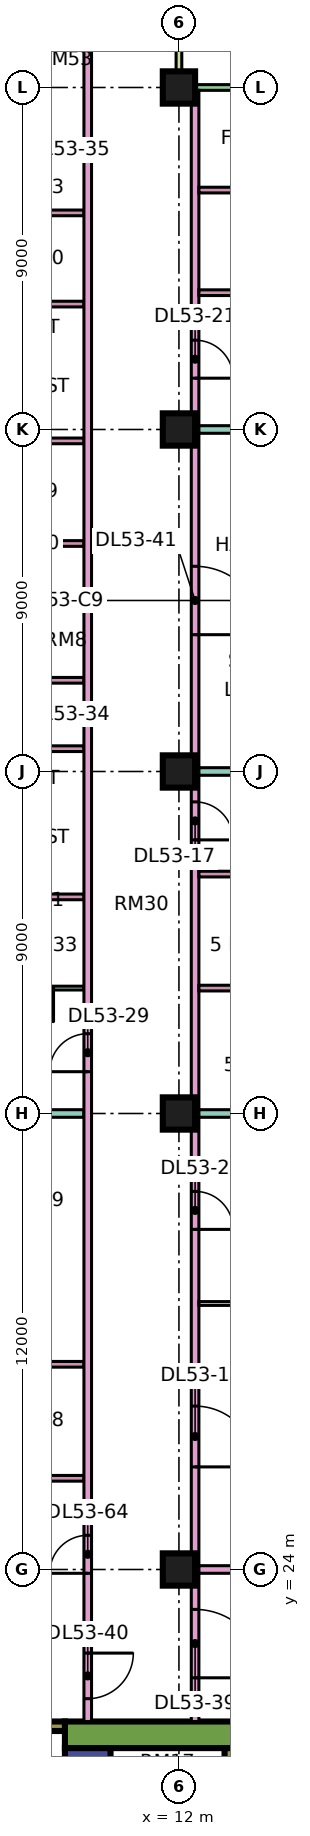
"""IFC4 building model, lengths in metres.
Left out: names, types, materials, properties, quantities, classifications, styles, units other than length and angle.
Written with IfcOpenShell. Run it as: python <this file> out.ifc"""

import sys

from ifc_helpers import new_model, si_unit, direction, frame, frame_2d, origin, origin_2d, place, context, subcontext, project, spatial, rectangle, extrude, element, fill, save


model = new_model("IFC4")
c1 = context("Model", 3, precision=1e-05, world=origin(), true_north=direction((0.0, 1.0)))
c2 = subcontext(c1, "Body", "Model", "MODEL_VIEW")
j1 = project(units=[si_unit("LENGTHUNIT", "METRE"), si_unit("PLANEANGLEUNIT", "RADIAN")], contexts=[c1])
p1 = place(None, origin())
s1 = spatial("IfcSite", under=j1, at=p1, CompositionType="ELEMENT")
p2 = place(p1, origin())
s2 = spatial("IfcBuilding", under=s1, at=p2, CompositionType="ELEMENT")
p3 = place(p2, frame((0.0, 0.0, 226.65)))
s3 = spatial("IfcBuildingStorey", under=s2, at=p3, CompositionType="ELEMENT", Elevation=226.65)
for number, where, z_axis, x_axis in (
    (1, (12.0, 24.0, 0.0), (0.0, 0.0, 1.0), (1.0, 0.0, 0.0)),
    (2, (12.0, 36.0, 0.0), (0.0, 0.0, 1.0), (1.0, 0.0, 0.0)),
    (3, (12.0, 45.0, 0.0), (0.0, 0.0, 1.0), (1.0, 0.0, 0.0)),
    (4, (12.0, 54.0, 0.0), (0.0, 0.0, 1.0), (1.0, 0.0, 0.0)),
    (5, (12.0, 63.0, 0.0), (0.0, 0.0, 1.0), (1.0, 0.0, 0.0)),
):
    element("IfcColumn", number, at=place(p3, frame(where, z_axis=z_axis, x_axis=x_axis)), inside=s3, PredefinedType="COLUMN", context=c2, shape_type="SweptSolid", body=[
        extrude(rectangle(XDim=0.85, YDim=0.85, at=origin_2d()), origin(), (0.0, 0.0, 1.0), 3.75),
    ])
p4 = place(p3, frame((9.0, 19.65, 0.0), z_axis=(0.0, 0.0, 1.0), x_axis=(1.0, 0.0, 0.0)))
e6 = element("IfcWall", 6, at=p4, inside=s3, PredefinedType="SHEAR", context=c2, shape_type="SweptSolid", body=[
    extrude(rectangle(XDim=25.0, YDim=0.7, at=frame_2d((12.5, 0.0))), origin(), (0.0, 0.0, 1.0), 3.75),
])
p5 = place(p4, frame((19.1, 0.0, 0.0)))
e7 = element("IfcOpeningElement", 7, at=p5, cuts=e6, PredefinedType="OPENING", context=c2, shape_type="SweptSolid", body=[
    extrude(rectangle(XDim=1.8, YDim=2.4, at=frame_2d((0.9, 1.2))), frame((0.0, 0.36, 0.0), z_axis=(0.0, -1.0, 0.0), x_axis=(1.0, 0.0, 0.0)), (0.0, 0.0, 1.0), 0.72),
])
p6 = place(p3, frame((9.6, 7.7, 0.0), z_axis=(0.0, 0.0, 1.0), x_axis=(0.0, 1.0, 0.0)))
e8 = element("IfcWall", 8, at=p6, inside=s3, PredefinedType="SHEAR", context=c2, shape_type="SweptSolid", body=[
    extrude(rectangle(XDim=11.6, YDim=1.2, at=frame_2d((5.8, 0.0))), origin(), (0.0, 0.0, 1.0), 3.75),
])
p7 = place(p6, frame((4.175, 0.0, 0.0)))
e9 = element("IfcOpeningElement", 9, at=p7, cuts=e8, PredefinedType="OPENING", context=c2, shape_type="SweptSolid", body=[
    extrude(rectangle(XDim=1.1, YDim=2.2, at=frame_2d((0.55, 1.1))), frame((0.0, 0.61, 0.0), z_axis=(0.0, -1.0, 0.0), x_axis=(1.0, 0.0, 0.0)), (0.0, 0.0, 1.0), 1.22),
])
p8 = place(p6, frame((6.675, 0.0, 0.0)))
e10 = element("IfcOpeningElement", 10, at=p8, cuts=e8, PredefinedType="OPENING", context=c2, shape_type="SweptSolid", body=[
    extrude(rectangle(XDim=1.1, YDim=2.2, at=frame_2d((0.55, 1.1))), frame((0.0, 0.61, 0.0), z_axis=(0.0, -1.0, 0.0), x_axis=(1.0, 0.0, 0.0)), (0.0, 0.0, 1.0), 1.22),
])
p9 = place(p6, frame((9.55, 0.0, 0.0)))
e11 = element("IfcOpeningElement", 11, at=p9, cuts=e8, PredefinedType="OPENING", context=c2, shape_type="SweptSolid", body=[
    extrude(rectangle(XDim=1.1, YDim=2.2, at=frame_2d((0.55, 1.1))), frame((0.0, 0.61, 0.0), z_axis=(0.0, -1.0, 0.0), x_axis=(1.0, 0.0, 0.0)), (0.0, 0.0, 1.0), 1.22),
])
p10 = place(p6, frame((1.85, 0.0, 0.0)))
e12 = element("IfcOpeningElement", 12, at=p10, cuts=e8, PredefinedType="OPENING", context=c2, shape_type="SweptSolid", body=[
    extrude(rectangle(XDim=0.9, YDim=2.1, at=frame_2d((0.45, 1.05))), frame((0.0, 0.61, 0.0), z_axis=(0.0, -1.0, 0.0), x_axis=(1.0, 0.0, 0.0)), (0.0, 0.0, 1.0), 1.22),
])
p11 = place(p3, frame((13.325, 7.7, 0.0), z_axis=(0.0, 0.0, 1.0), x_axis=(0.0, 1.0, 0.0)))
e13 = element("IfcWall", 13, at=p11, inside=s3, PredefinedType="SHEAR", context=c2, shape_type="SweptSolid", body=[
    extrude(rectangle(XDim=11.6, YDim=0.25, at=frame_2d((5.8, 0.0))), origin(), (0.0, 0.0, 1.0), 3.75),
])
p12 = place(p3, frame((2.1, 19.875, 0.0), z_axis=(0.0, 0.0, 1.0), x_axis=(1.0, 0.0, 0.0)))
e14 = element("IfcWall", 14, at=p12, inside=s3, PredefinedType="SHEAR", context=c2, shape_type="SweptSolid", body=[
    extrude(rectangle(XDim=6.9, YDim=0.25, at=frame_2d((3.45, 0.0))), origin(), (0.0, 0.0, 1.0), 3.75),
])
p13 = place(p12, frame((1.175, 0.0, 0.0)))
e15 = element("IfcOpeningElement", 15, at=p13, cuts=e14, PredefinedType="OPENING", context=c2, shape_type="SweptSolid", body=[
    extrude(rectangle(XDim=1.1, YDim=2.2, at=frame_2d((0.55, 1.1))), frame((0.0, 0.135, 0.0), z_axis=(0.0, -1.0, 0.0), x_axis=(1.0, 0.0, 0.0)), (0.0, 0.0, 1.0), 0.27),
])
p14 = place(p12, frame((4.6, 0.0, 0.0)))
e16 = element("IfcOpeningElement", 16, at=p14, cuts=e14, PredefinedType="OPENING", context=c2, shape_type="SweptSolid", body=[
    extrude(rectangle(XDim=1.2, YDim=2.2, at=frame_2d((0.6, 1.1))), frame((0.0, 0.135, 0.0), z_axis=(0.0, -1.0, 0.0), x_axis=(1.0, 0.0, 0.0)), (0.0, 0.0, 1.0), 0.27),
])
p15 = place(p3, frame((22.425, 63.0, 0.0), z_axis=(0.0, 0.0, 1.0), x_axis=(-1.0, 0.0, 0.0)))
e17 = element("IfcWall", 17, at=p15, inside=s3, PredefinedType="SOLIDWALL", context=c2, shape_type="SweptSolid", body=[
    extrude(rectangle(XDim=10.35, YDim=0.15, at=frame_2d((5.175, 0.0))), origin(), (0.0, 0.0, 1.0), 3.35),
])
p16 = place(p15, frame((1.4, 0.0, 0.0)))
e18 = element("IfcOpeningElement", 18, at=p16, cuts=e17, PredefinedType="OPENING", context=c2, shape_type="SweptSolid", body=[
    extrude(rectangle(XDim=1.8, YDim=2.4, at=frame_2d((0.9, 1.2))), frame((0.0, 0.085, 0.0), z_axis=(0.0, -1.0, 0.0), x_axis=(1.0, 0.0, 0.0)), (0.0, 0.0, 1.0), 0.17),
])
p17 = place(p15, frame((5.75, 0.0, 0.45)))
e19 = element("IfcOpeningElement", 19, at=p17, cuts=e17, PredefinedType="OPENING", context=c2, shape_type="SweptSolid", body=[
    extrude(rectangle(XDim=3.0, YDim=2.4, at=frame_2d((1.5, 1.2))), frame((0.0, 0.085, 0.0), z_axis=(0.0, -1.0, 0.0), x_axis=(1.0, 0.0, 0.0)), (0.0, 0.0, 1.0), 0.17),
])
p18 = place(p3, frame((12.0, 64.5, 0.0), z_axis=(0.0, 0.0, 1.0), x_axis=(0.0, -1.0, 0.0)))
e20 = element("IfcWall", 20, at=p18, inside=s3, PredefinedType="SOLIDWALL", context=c2, shape_type="SweptSolid", body=[
    extrude(rectangle(XDim=1.5, YDim=0.15, at=frame_2d((0.75, 0.0))), origin(), (0.0, 0.0, 1.0), 3.35),
])
p19 = place(p3, frame((0.0, 36.0, 0.0), z_axis=(0.0, 0.0, 1.0), x_axis=(1.0, 0.0, 0.0)))
e21 = element("IfcWall", 21, at=p19, inside=s3, PredefinedType="PARTITIONING", context=c2, shape_type="SweptSolid", body=[
    extrude(rectangle(XDim=9.5, YDim=0.2, at=frame_2d((4.75, 0.0))), origin(), (0.0, 0.0, 1.0), 3.35),
])
p20 = place(p3, frame((0.074, 22.4, 0.0), z_axis=(0.0, 0.0, 1.0), x_axis=(1.0, 0.0, 0.0)))
e22 = element("IfcWall", 22, at=p20, inside=s3, PredefinedType="PARTITIONING", context=c2, shape_type="SweptSolid", body=[
    extrude(rectangle(XDim=9.426, YDim=0.2, at=frame_2d((4.713, 0.0))), origin(), (0.0, 0.0, 1.0), 3.35),
])
for number, where, z_axis, x_axis in (
    (23, (6.975, 26.4, 0.0), (0.0, 0.0, 1.0), (1.0, 0.0, 0.0)),
    (24, (6.975, 29.4, 0.0), (0.0, 0.0, 1.0), (1.0, 0.0, 0.0)),
):
    element("IfcWall", number, at=place(p3, frame(where, z_axis=z_axis, x_axis=x_axis)), inside=s3, PredefinedType="PARTITIONING", context=c2, shape_type="SweptSolid", body=[
        extrude(rectangle(XDim=2.525, YDim=0.15, at=frame_2d((1.262, 0.0))), origin(), (0.0, 0.0, 1.0), 3.35),
    ])
p21 = place(p3, frame((6.975, 39.3, 0.0), z_axis=(0.0, 0.0, 1.0), x_axis=(1.0, 0.0, 0.0)))
e25 = element("IfcWall", 25, at=p21, inside=s3, PredefinedType="PARTITIONING", context=c2, shape_type="SweptSolid", body=[
    extrude(rectangle(XDim=2.525, YDim=0.1, at=frame_2d((1.262, 0.0))), origin(), (0.0, 0.0, 1.0), 3.35),
])
p22 = place(p21, frame((0.825, 0.0, 0.0)))
e26 = element("IfcOpeningElement", 26, at=p22, cuts=e25, PredefinedType="OPENING", context=c2, shape_type="SweptSolid", body=[
    extrude(rectangle(XDim=0.9, YDim=2.1, at=frame_2d((0.45, 1.05))), frame((0.0, 0.06, 0.0), z_axis=(0.0, -1.0, 0.0), x_axis=(1.0, 0.0, 0.0)), (0.0, 0.0, 1.0), 0.12),
])
for number, where, z_axis, x_axis in (
    (27, (6.975, 41.7, 0.0), (0.0, 0.0, 1.0), (1.0, 0.0, 0.0)),
    (28, (6.975, 45.6, 0.0), (0.0, 0.0, 1.0), (1.0, 0.0, 0.0)),
    (29, (6.975, 47.4, 0.0), (0.0, 0.0, 1.0), (1.0, 0.0, 0.0)),
    (30, (6.975, 51.0, 0.0), (0.0, 0.0, 1.0), (1.0, 0.0, 0.0)),
    (31, (6.975, 53.7, 0.0), (0.0, 0.0, 1.0), (1.0, 0.0, 0.0)),
    (32, (6.975, 57.3, 0.0), (0.0, 0.0, 1.0), (1.0, 0.0, 0.0)),
    (33, (6.975, 59.7, 0.0), (0.0, 0.0, 1.0), (1.0, 0.0, 0.0)),
):
    element("IfcWall", number, at=place(p3, frame(where, z_axis=z_axis, x_axis=x_axis)), inside=s3, PredefinedType="PARTITIONING", context=c2, shape_type="SweptSolid", body=[
        extrude(rectangle(XDim=2.525, YDim=0.15, at=frame_2d((1.262, 0.0))), origin(), (0.0, 0.0, 1.0), 3.35),
    ])
p23 = place(p3, frame((9.6, 20.0, 0.0), z_axis=(0.0, 0.0, 1.0), x_axis=(0.0, 1.0, 0.0)))
e34 = element("IfcWall", 34, at=p23, inside=s3, PredefinedType="PARTITIONING", context=c2, shape_type="SweptSolid", body=[
    extrude(rectangle(XDim=44.35, YDim=0.2, at=frame_2d((22.175, 0.0))), origin(), (0.0, 0.0, 1.0), 3.35),
])
p24 = place(p23, frame((17.1, 0.0, 0.0)))
e35 = element("IfcOpeningElement", 35, at=p24, cuts=e34, PredefinedType="OPENING", context=c2, shape_type="SweptSolid", body=[
    extrude(rectangle(XDim=1.0, YDim=2.1, at=frame_2d((0.5, 1.05))), frame((0.0, 0.11, 0.0), z_axis=(0.0, -1.0, 0.0), x_axis=(1.0, 0.0, 0.0)), (0.0, 0.0, 1.0), 0.22),
])
p25 = place(p23, frame((0.6, 0.0, 0.0)))
e36 = element("IfcOpeningElement", 36, at=p25, cuts=e34, PredefinedType="OPENING", context=c2, shape_type="SweptSolid", body=[
    extrude(rectangle(XDim=1.2, YDim=2.1, at=frame_2d((0.6, 1.05))), frame((0.0, 0.11, 0.0), z_axis=(0.0, -1.0, 0.0), x_axis=(1.0, 0.0, 0.0)), (0.0, 0.0, 1.0), 0.22),
])
p26 = place(p23, frame((3.9, 0.0, 0.0)))
e37 = element("IfcOpeningElement", 37, at=p26, cuts=e34, PredefinedType="OPENING", context=c2, shape_type="SweptSolid", body=[
    extrude(rectangle(XDim=1.0, YDim=2.1, at=frame_2d((0.5, 1.05))), frame((0.0, 0.11, 0.0), z_axis=(0.0, -1.0, 0.0), x_axis=(1.0, 0.0, 0.0)), (0.0, 0.0, 1.0), 0.22),
])
p27 = place(p3, frame((12.425, 20.0, 0.0), z_axis=(0.0, 0.0, 1.0), x_axis=(0.0, 1.0, 0.0)))
e38 = element("IfcWall", 38, at=p27, inside=s3, PredefinedType="PARTITIONING", context=c2, shape_type="SweptSolid", body=[
    extrude(rectangle(XDim=42.926, YDim=0.2, at=frame_2d((21.463, 0.0))), origin(), (0.0, 0.0, 1.0), 3.35),
])
p28 = place(p27, frame((6.7, 0.0, 0.0)))
e39 = element("IfcOpeningElement", 39, at=p28, cuts=e38, PredefinedType="OPENING", context=c2, shape_type="SweptSolid", body=[
    extrude(rectangle(XDim=1.6, YDim=2.1, at=frame_2d((0.8, 1.05))), frame((0.0, 0.11, 0.0), z_axis=(0.0, -1.0, 0.0), x_axis=(1.0, 0.0, 0.0)), (0.0, 0.0, 1.0), 0.22),
])
p29 = place(p27, frame((12.95, 0.0, 0.0)))
e40 = element("IfcOpeningElement", 40, at=p29, cuts=e38, PredefinedType="OPENING", context=c2, shape_type="SweptSolid", body=[
    extrude(rectangle(XDim=1.0, YDim=2.1, at=frame_2d((0.5, 1.05))), frame((0.0, 0.11, 0.0), z_axis=(0.0, -1.0, 0.0), x_axis=(1.0, 0.0, 0.0)), (0.0, 0.0, 1.0), 0.22),
])
p30 = place(p27, frame((23.2, 0.0, 0.0)))
e41 = element("IfcOpeningElement", 41, at=p30, cuts=e38, PredefinedType="OPENING", context=c2, shape_type="SweptSolid", body=[
    extrude(rectangle(XDim=1.0, YDim=2.1, at=frame_2d((0.5, 1.05))), frame((0.0, 0.11, 0.0), z_axis=(0.0, -1.0, 0.0), x_axis=(1.0, 0.0, 0.0)), (0.0, 0.0, 1.0), 0.22),
])
p31 = place(p27, frame((35.35, 0.0, 0.0)))
e42 = element("IfcOpeningElement", 42, at=p31, cuts=e38, PredefinedType="OPENING", context=c2, shape_type="SweptSolid", body=[
    extrude(rectangle(XDim=1.0, YDim=2.1, at=frame_2d((0.5, 1.05))), frame((0.0, 0.11, 0.0), z_axis=(0.0, -1.0, 0.0), x_axis=(1.0, 0.0, 0.0)), (0.0, 0.0, 1.0), 0.22),
])
p32 = place(p27, frame((1.15, 0.0, 0.0)))
e43 = element("IfcOpeningElement", 43, at=p32, cuts=e38, PredefinedType="OPENING", context=c2, shape_type="SweptSolid", body=[
    extrude(rectangle(XDim=1.8, YDim=2.1, at=frame_2d((0.9, 1.05))), frame((0.0, 0.11, 0.0), z_axis=(0.0, -1.0, 0.0), x_axis=(1.0, 0.0, 0.0)), (0.0, 0.0, 1.0), 0.22),
])
p33 = place(p27, frame((28.6, 0.0, 0.0)))
e44 = element("IfcOpeningElement", 44, at=p33, cuts=e38, PredefinedType="OPENING", context=c2, shape_type="SweptSolid", body=[
    extrude(rectangle(XDim=1.8, YDim=2.1, at=frame_2d((0.9, 1.05))), frame((0.0, 0.11, 0.0), z_axis=(0.0, -1.0, 0.0), x_axis=(1.0, 0.0, 0.0)), (0.0, 0.0, 1.0), 0.22),
])
p34 = place(p3, frame((12.525, 24.0, 0.0), z_axis=(0.0, 0.0, 1.0), x_axis=(1.0, 0.0, 0.0)))
e45 = element("IfcWall", 45, at=p34, inside=s3, PredefinedType="PARTITIONING", context=c2, shape_type="SweptSolid", body=[
    extrude(rectangle(XDim=8.975, YDim=0.2, at=frame_2d((4.488, 0.0))), origin(), (0.0, 0.0, 1.0), 3.35),
])
p35 = place(p3, frame((12.525, 31.0, 0.0), z_axis=(0.0, 0.0, 1.0), x_axis=(1.0, 0.0, 0.0)))
e46 = element("IfcWall", 46, at=p35, inside=s3, PredefinedType="PARTITIONING", context=c2, shape_type="SweptSolid", body=[
    extrude(rectangle(XDim=8.975, YDim=0.1, at=frame_2d((4.488, 0.0))), origin(), (0.0, 0.0, 1.0), 3.35),
])
p36 = place(p3, frame((12.525, 36.0, 0.0), z_axis=(0.0, 0.0, 1.0), x_axis=(1.0, 0.0, 0.0)))
e47 = element("IfcWall", 47, at=p36, inside=s3, PredefinedType="PARTITIONING", context=c2, shape_type="SweptSolid", body=[
    extrude(rectangle(XDim=11.475, YDim=0.2, at=frame_2d((5.738, 0.0))), origin(), (0.0, 0.0, 1.0), 3.35),
])
p37 = place(p3, frame((12.525, 39.3, 0.0), z_axis=(0.0, 0.0, 1.0), x_axis=(1.0, 0.0, 0.0)))
e48 = element("IfcWall", 48, at=p37, inside=s3, PredefinedType="PARTITIONING", context=c2, shape_type="SweptSolid", body=[
    extrude(rectangle(XDim=4.025, YDim=0.15, at=frame_2d((2.013, 0.0))), origin(), (0.0, 0.0, 1.0), 3.35),
])
p38 = place(p3, frame((12.525, 42.3, 0.0), z_axis=(0.0, 0.0, 1.0), x_axis=(1.0, 0.0, 0.0)))
e49 = element("IfcWall", 49, at=p38, inside=s3, PredefinedType="PARTITIONING", context=c2, shape_type="SweptSolid", body=[
    extrude(rectangle(XDim=4.025, YDim=0.15, at=frame_2d((2.013, 0.0))), origin(), (0.0, 0.0, 1.0), 3.35),
])
p39 = place(p38, frame((1.55, 0.0, 0.0)))
e50 = element("IfcOpeningElement", 50, at=p39, cuts=e49, PredefinedType="OPENING", context=c2, shape_type="SweptSolid", body=[
    extrude(rectangle(XDim=0.8, YDim=2.1, at=frame_2d((0.4, 1.05))), frame((0.0, 0.085, 0.0), z_axis=(0.0, -1.0, 0.0), x_axis=(1.0, 0.0, 0.0)), (0.0, 0.0, 1.0), 0.17),
])
p40 = place(p3, frame((12.525, 45.0, 0.0), z_axis=(0.0, 0.0, 1.0), x_axis=(1.0, 0.0, 0.0)))
e51 = element("IfcWall", 51, at=p40, inside=s3, PredefinedType="PARTITIONING", context=c2, shape_type="SweptSolid", body=[
    extrude(rectangle(XDim=11.401, YDim=0.2, at=frame_2d((5.701, 0.0))), origin(), (0.0, 0.0, 1.0), 3.35),
])
p41 = place(p3, frame((12.525, 54.0, 0.0), z_axis=(0.0, 0.0, 1.0), x_axis=(1.0, 0.0, 0.0)))
e52 = element("IfcWall", 52, at=p41, inside=s3, PredefinedType="PARTITIONING", context=c2, shape_type="SweptSolid", body=[
    extrude(rectangle(XDim=11.475, YDim=0.2, at=frame_2d((5.738, 0.0))), origin(), (0.0, 0.0, 1.0), 3.35),
])
p42 = place(p3, frame((12.525, 57.6, 0.0), z_axis=(0.0, 0.0, 1.0), x_axis=(1.0, 0.0, 0.0)))
e53 = element("IfcWall", 53, at=p42, inside=s3, PredefinedType="PARTITIONING", context=c2, shape_type="SweptSolid", body=[
    extrude(rectangle(XDim=5.375, YDim=0.15, at=frame_2d((2.688, 0.0))), origin(), (0.0, 0.0, 1.0), 3.35),
])
p43 = place(p3, frame((12.525, 60.3, 0.0), z_axis=(0.0, 0.0, 1.0), x_axis=(1.0, 0.0, 0.0)))
e54 = element("IfcWall", 54, at=p43, inside=s3, PredefinedType="PARTITIONING", context=c2, shape_type="SweptSolid", body=[
    extrude(rectangle(XDim=5.225, YDim=0.15, at=frame_2d((2.613, 0.0))), origin(), (0.0, 0.0, 1.0), 3.35),
])
p44 = place(p28, frame((1.6, 0.0, 0.0), z_axis=(0.0, 0.0, 1.0), x_axis=(-1.0, 0.0, 0.0)))
e55 = element("IfcDoor", 55, at=p44, inside=s3, OperationType="DOUBLE_DOOR_SINGLE_SWING", PredefinedType="DOOR", context=c2, shape_type="SweptSolid", body=[
    extrude(rectangle(XDim=1.6, YDim=2.1, at=frame_2d((0.8, 1.05))), frame((0.0, 0.025, 0.0), z_axis=(0.0, -1.0, 0.0), x_axis=(1.0, 0.0, 0.0)), (0.0, 0.0, 1.0), 0.05),
])
fill(e39, e55)
p45 = place(p29, frame((1.0, 0.0, 0.0), z_axis=(0.0, 0.0, 1.0), x_axis=(-1.0, 0.0, 0.0)))
e56 = element("IfcDoor", 56, at=p45, inside=s3, OperationType="SINGLE_SWING_LEFT", PredefinedType="DOOR", context=c2, shape_type="SweptSolid", body=[
    extrude(rectangle(XDim=1.0, YDim=2.1, at=frame_2d((0.5, 1.05))), frame((0.0, 0.025, 0.0), z_axis=(0.0, -1.0, 0.0), x_axis=(1.0, 0.0, 0.0)), (0.0, 0.0, 1.0), 0.05),
])
fill(e40, e56)
p46 = place(p30, frame((1.0, 0.0, 0.0), z_axis=(0.0, 0.0, 1.0), x_axis=(-1.0, 0.0, 0.0)))
e57 = element("IfcDoor", 57, at=p46, inside=s3, OperationType="SINGLE_SWING_LEFT", PredefinedType="DOOR", context=c2, shape_type="SweptSolid", body=[
    extrude(rectangle(XDim=1.0, YDim=2.1, at=frame_2d((0.5, 1.05))), frame((0.0, 0.025, 0.0), z_axis=(0.0, -1.0, 0.0), x_axis=(1.0, 0.0, 0.0)), (0.0, 0.0, 1.0), 0.05),
])
fill(e41, e57)
p47 = place(p31, frame((1.0, 0.0, 0.0), z_axis=(0.0, 0.0, 1.0), x_axis=(-1.0, 0.0, 0.0)))
e58 = element("IfcDoor", 58, at=p47, inside=s3, OperationType="SINGLE_SWING_LEFT", PredefinedType="DOOR", context=c2, shape_type="SweptSolid", body=[
    extrude(rectangle(XDim=1.0, YDim=2.1, at=frame_2d((0.5, 1.05))), frame((0.0, 0.025, 0.0), z_axis=(0.0, -1.0, 0.0), x_axis=(1.0, 0.0, 0.0)), (0.0, 0.0, 1.0), 0.05),
])
fill(e42, e58)
p48 = place(p24, origin())
e59 = element("IfcDoor", 59, at=p48, inside=s3, OperationType="SINGLE_SWING_LEFT", PredefinedType="DOOR", context=c2, shape_type="SweptSolid", body=[
    extrude(rectangle(XDim=1.0, YDim=2.1, at=frame_2d((0.5, 1.05))), frame((0.0, 0.025, 0.0), z_axis=(0.0, -1.0, 0.0), x_axis=(1.0, 0.0, 0.0)), (0.0, 0.0, 1.0), 0.05),
])
fill(e35, e59)
p49 = place(p22, origin())
e60 = element("IfcDoor", 60, at=p49, inside=s3, OperationType="SINGLE_SWING_RIGHT", PredefinedType="DOOR", context=c2, shape_type="SweptSolid", body=[
    extrude(rectangle(XDim=0.9, YDim=2.1, at=frame_2d((0.45, 1.05))), frame((0.0, 0.025, 0.0), z_axis=(0.0, -1.0, 0.0), x_axis=(1.0, 0.0, 0.0)), (0.0, 0.0, 1.0), 0.05),
])
fill(e26, e60)
p50 = place(p32, frame((1.8, 0.0, 0.0), z_axis=(0.0, 0.0, 1.0), x_axis=(-1.0, 0.0, 0.0)))
e61 = element("IfcDoor", 61, at=p50, inside=s3, OperationType="DOUBLE_DOOR_SINGLE_SWING", PredefinedType="DOOR", context=c2, shape_type="SweptSolid", body=[
    extrude(rectangle(XDim=1.8, YDim=2.1, at=frame_2d((0.9, 1.05))), frame((0.0, 0.025, 0.0), z_axis=(0.0, -1.0, 0.0), x_axis=(1.0, 0.0, 0.0)), (0.0, 0.0, 1.0), 0.05),
])
fill(e43, e61)
p51 = place(p25, origin())
e62 = element("IfcDoor", 62, at=p51, inside=s3, OperationType="SINGLE_SWING_RIGHT", PredefinedType="DOOR", context=c2, shape_type="SweptSolid", body=[
    extrude(rectangle(XDim=1.2, YDim=2.1, at=frame_2d((0.6, 1.05))), frame((0.0, 0.025, 0.0), z_axis=(0.0, -1.0, 0.0), x_axis=(1.0, 0.0, 0.0)), (0.0, 0.0, 1.0), 0.05),
])
fill(e36, e62)
p52 = place(p33, frame((1.8, 0.0, 0.0), z_axis=(0.0, 0.0, 1.0), x_axis=(-1.0, 0.0, 0.0)))
e63 = element("IfcDoor", 63, at=p52, inside=s3, OperationType="DOUBLE_DOOR_SINGLE_SWING", PredefinedType="DOOR", context=c2, shape_type="SweptSolid", body=[
    extrude(rectangle(XDim=1.8, YDim=2.1, at=frame_2d((0.9, 1.05))), frame((0.0, 0.025, 0.0), z_axis=(0.0, -1.0, 0.0), x_axis=(1.0, 0.0, 0.0)), (0.0, 0.0, 1.0), 0.05),
])
fill(e44, e63)
p53 = place(p26, origin())
e64 = element("IfcDoor", 64, at=p53, inside=s3, OperationType="SINGLE_SWING_LEFT", PredefinedType="DOOR", context=c2, shape_type="SweptSolid", body=[
    extrude(rectangle(XDim=1.0, YDim=2.1, at=frame_2d((0.5, 1.05))), frame((0.0, 0.025, 0.0), z_axis=(0.0, -1.0, 0.0), x_axis=(1.0, 0.0, 0.0)), (0.0, 0.0, 1.0), 0.05),
])
fill(e37, e64)
save(model, sys.argv[1])
